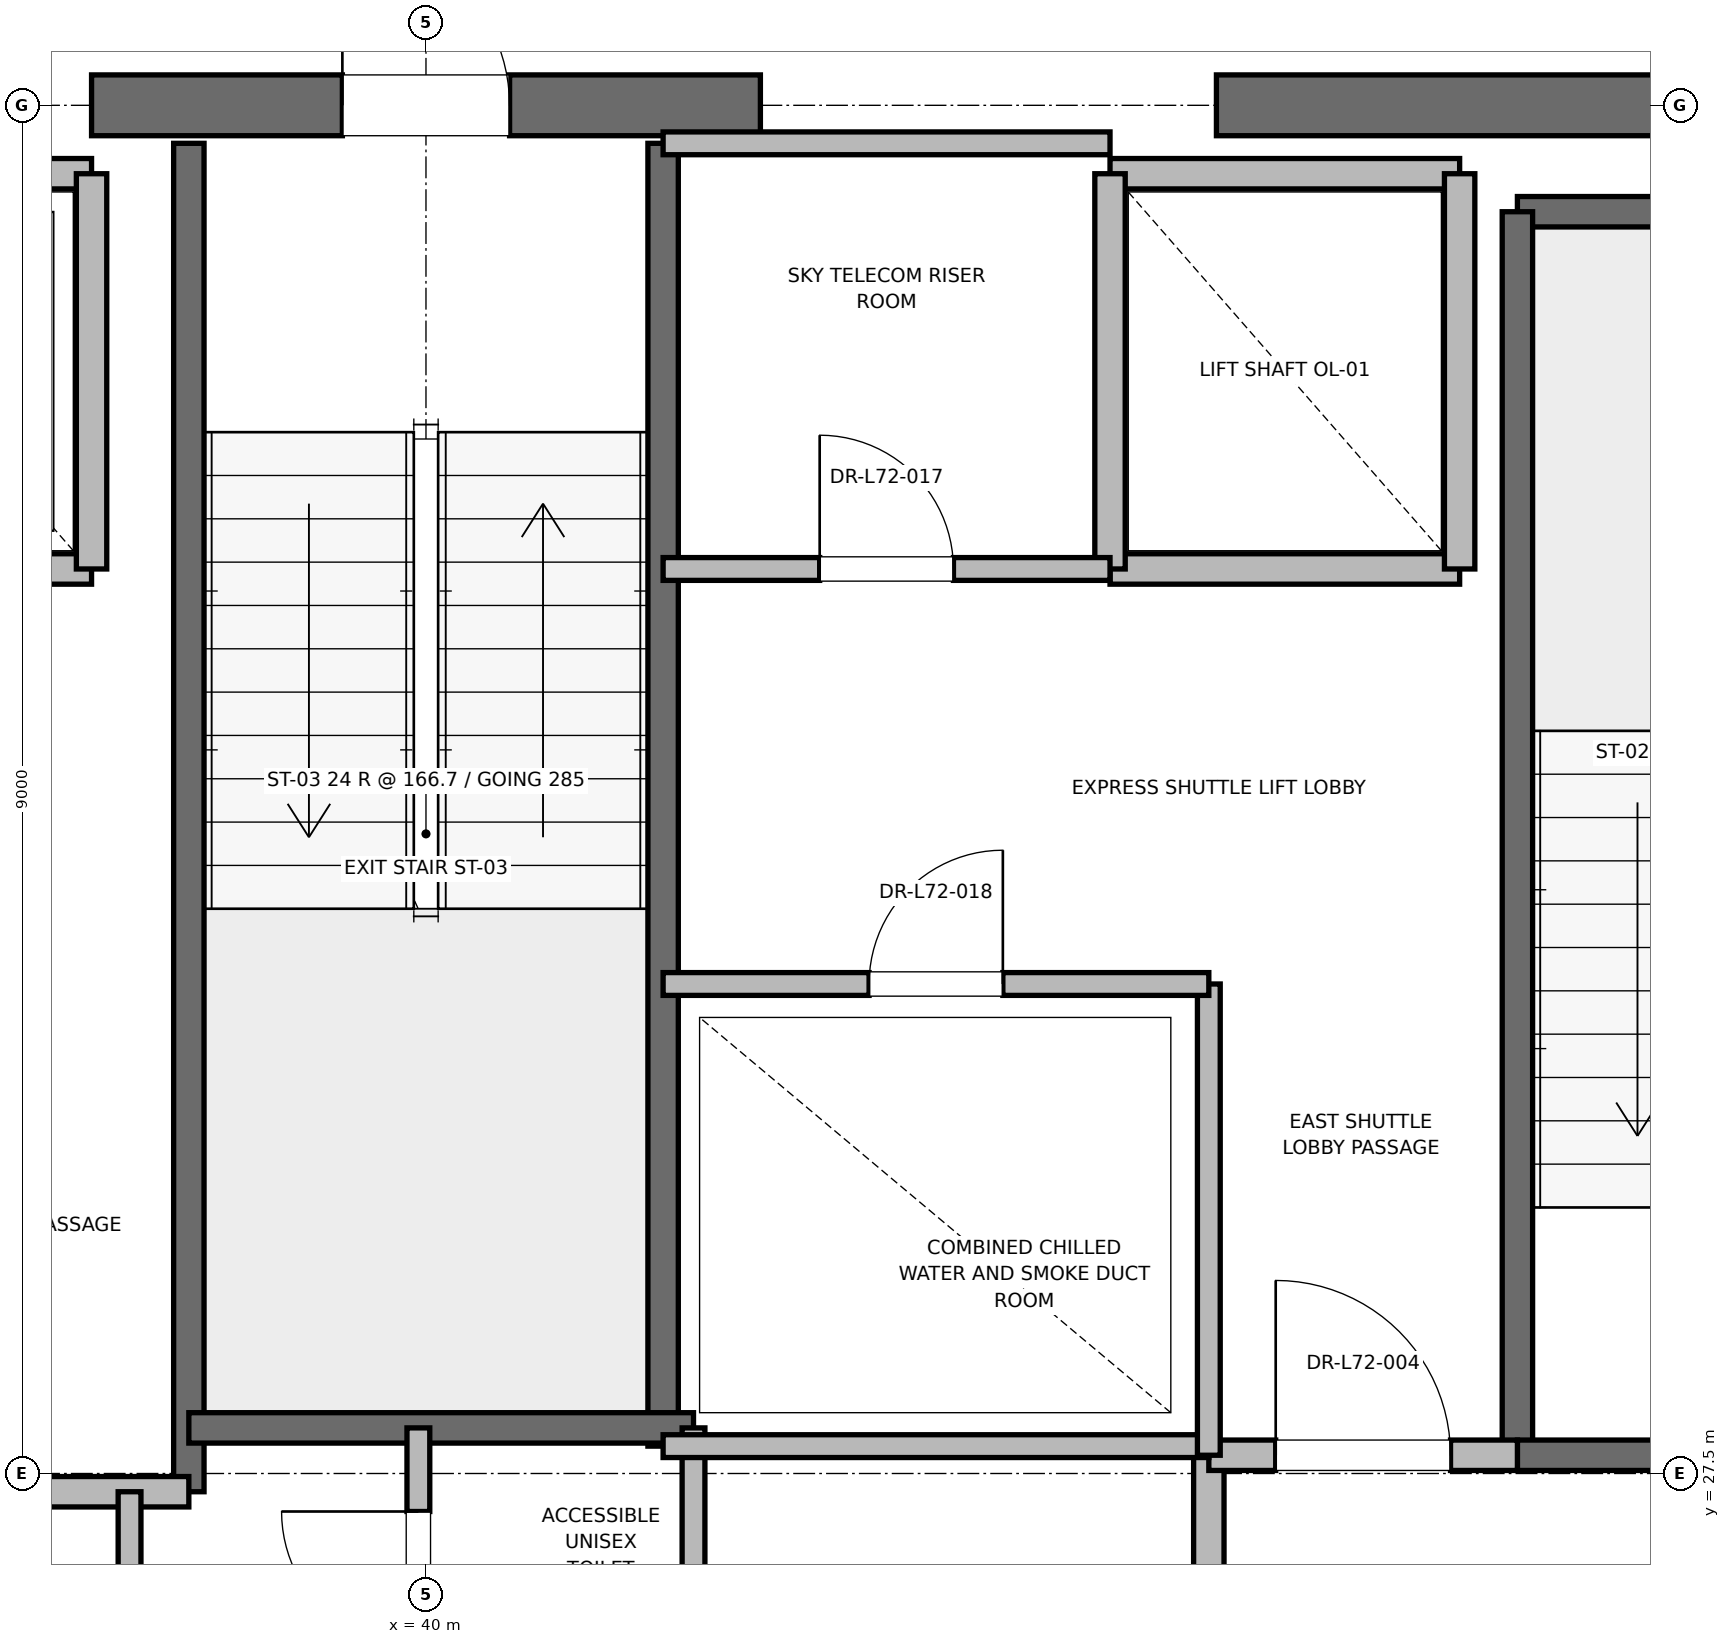
"""IFC4 building model, lengths in metres.
Left out: names, types, materials, properties, quantities, classifications, styles, units other than length and angle.
Written with IfcOpenShell. Run it as: python <this file> out.ifc"""

import sys

from ifc_helpers import new_model, si_unit, direction, frame, frame_2d, origin, place, context, subcontext, project, spatial, rectangle, extrude, element, fill, save


model = new_model("IFC4")
c1 = context("Model", 3, precision=1e-05, world=origin(), true_north=direction((0.0, 1.0)))
c2 = subcontext(c1, "Body", "Model", "MODEL_VIEW")
j1 = project(units=[si_unit("LENGTHUNIT", "METRE"), si_unit("PLANEANGLEUNIT", "RADIAN")], contexts=[c1])
p1 = place(None, origin())
s1 = spatial("IfcSite", under=j1, at=p1, CompositionType="ELEMENT")
p2 = place(p1, origin())
s2 = spatial("IfcBuilding", under=s1, at=p2, CompositionType="ELEMENT")
p3 = place(p2, frame((0.0, 0.0, 310.8)))
s3 = spatial("IfcBuildingStorey", under=s2, at=p3, CompositionType="ELEMENT", Elevation=310.8)
p4 = place(p3, frame((37.8, 36.5, 0.0), z_axis=(0.0, 0.0, 1.0), x_axis=(1.0, 0.0, 0.0)))
e1 = element("IfcWall", 1, at=p4, inside=s3, PredefinedType="SHEAR", context=c2, shape_type="SweptSolid", body=[
    extrude(rectangle(XDim=4.4, YDim=0.4, at=frame_2d((2.2, 0.0))), origin(), (0.0, 0.0, 1.0), 3.785),
])
p5 = place(p4, frame((1.65, 0.0, 0.0)))
e2 = element("IfcOpeningElement", 2, at=p5, cuts=e1, PredefinedType="OPENING", context=c2, shape_type="SweptSolid", body=[
    extrude(rectangle(XDim=1.1, YDim=2.15, at=frame_2d((0.55, 1.075))), frame((0.0, 0.2, 0.0), z_axis=(0.0, -1.0, 0.0), x_axis=(1.0, 0.0, 0.0)), (0.0, 0.0, 1.0), 0.4),
])
p6 = place(p3, frame((45.2, 36.5, 0.0), z_axis=(0.0, 0.0, 1.0), x_axis=(1.0, 0.0, 0.0)))
e3 = element("IfcWall", 3, at=p6, inside=s3, PredefinedType="SHEAR", context=c2, shape_type="SweptSolid", body=[
    extrude(rectangle(XDim=5.8, YDim=0.4, at=frame_2d((2.9, 0.0))), origin(), (0.0, 0.0, 1.0), 3.785),
])
p7 = place(p3, frame((47.18, 35.8, 0.0), z_axis=(0.0, 0.0, 1.0), x_axis=(1.0, 0.0, 0.0)))
e4 = element("IfcWall", 4, at=p7, inside=s3, PredefinedType="SOLIDWALL", context=c2, shape_type="SweptSolid", body=[
    extrude(rectangle(XDim=3.12, YDim=0.2, at=frame_2d((1.56, 0.0))), origin(), (0.0, 0.0, 1.0), 3.785),
])
p8 = place(p3, frame((47.18, 27.62, 0.0), z_axis=(0.0, 0.0, 1.0), x_axis=(0.0, 1.0, 0.0)))
e5 = element("IfcWall", 5, at=p8, inside=s3, PredefinedType="SOLIDWALL", context=c2, shape_type="SweptSolid", body=[
    extrude(rectangle(XDim=8.18, YDim=0.2, at=frame_2d((4.09, 0.0))), origin(), (0.0, 0.0, 1.0), 3.785),
])
p9 = place(p3, frame((47.18, 27.62, 0.0), z_axis=(0.0, 0.0, 1.0), x_axis=(1.0, 0.0, 0.0)))
e6 = element("IfcWall", 6, at=p9, inside=s3, PredefinedType="SOLIDWALL", context=c2, shape_type="SweptSolid", body=[
    extrude(rectangle(XDim=3.12, YDim=0.2, at=frame_2d((1.56, 0.0))), origin(), (0.0, 0.0, 1.0), 3.785),
])
p10 = place(p9, frame((1.01, 0.0, 0.0)))
e7 = element("IfcOpeningElement", 7, at=p10, cuts=e6, PredefinedType="OPENING", context=c2, shape_type="SweptSolid", body=[
    extrude(rectangle(XDim=1.1, YDim=2.15, at=frame_2d((0.55, 1.075))), frame((0.0, 0.1, 0.0), z_axis=(0.0, -1.0, 0.0), x_axis=(1.0, 0.0, 0.0)), (0.0, 0.0, 1.0), 0.2),
])
p11 = place(p3, frame((38.44, 27.38, 0.0), z_axis=(0.0, 0.0, 1.0), x_axis=(0.0, 1.0, 0.0)))
e8 = element("IfcWall", 8, at=p11, inside=s3, PredefinedType="SOLIDWALL", context=c2, shape_type="SweptSolid", body=[
    extrude(rectangle(XDim=8.87, YDim=0.2, at=frame_2d((4.435, 0.0))), origin(), (0.0, 0.0, 1.0), 3.785),
])
p12 = place(p3, frame((41.56, 27.68, 0.0), z_axis=(0.0, 0.0, 1.0), x_axis=(0.0, 1.0, 0.0)))
e9 = element("IfcWall", 9, at=p12, inside=s3, PredefinedType="SOLIDWALL", context=c2, shape_type="SweptSolid", body=[
    extrude(rectangle(XDim=8.57, YDim=0.2, at=frame_2d((4.285, 0.0))), origin(), (0.0, 0.0, 1.0), 3.785),
])
p13 = place(p3, frame((38.44, 27.8, 0.0), z_axis=(0.0, 0.0, 1.0), x_axis=(1.0, 0.0, 0.0)))
e10 = element("IfcWall", 10, at=p13, inside=s3, PredefinedType="SOLIDWALL", context=c2, shape_type="SweptSolid", body=[
    extrude(rectangle(XDim=3.32, YDim=0.2, at=frame_2d((1.66, 0.0))), origin(), (0.0, 0.0, 1.0), 3.785),
])
p14 = place(p3, frame((32.82, 27.38, 0.0), z_axis=(0.0, 0.0, 1.0), x_axis=(1.0, 0.0, 0.0)))
e11 = element("IfcWall", 11, at=p14, inside=s3, PredefinedType="PARTITIONING", context=c2, shape_type="SweptSolid", body=[
    extrude(rectangle(XDim=5.62, YDim=0.2, at=frame_2d((2.81, 0.0))), origin(), (0.0, 0.0, 1.0), 3.785),
])
p15 = place(p3, frame((45.15, 24.25, 0.0), z_axis=(0.0, 0.0, 1.0), x_axis=(0.0, 1.0, 0.0)))
e12 = element("IfcWall", 12, at=p15, inside=s3, PredefinedType="PARTITIONING", context=c2, shape_type="SweptSolid", body=[
    extrude(rectangle(XDim=3.37, YDim=0.2, at=frame_2d((1.685, 0.0))), origin(), (0.0, 0.0, 1.0), 3.785),
])
p16 = place(p3, frame((45.15, 27.62, 0.0), z_axis=(0.0, 0.0, 1.0), x_axis=(1.0, 0.0, 0.0)))
e13 = element("IfcWall", 13, at=p16, inside=s3, PredefinedType="PARTITIONING", context=c2, shape_type="SweptSolid", body=[
    extrude(rectangle(XDim=2.03, YDim=0.2, at=frame_2d((1.015, 0.0))), origin(), (0.0, 0.0, 1.0), 3.785),
])
p17 = place(p16, frame((0.44, 0.0, 0.0)))
e14 = element("IfcOpeningElement", 14, at=p17, cuts=e13, PredefinedType="OPENING", context=c2, shape_type="SweptSolid", body=[
    extrude(rectangle(XDim=1.15, YDim=2.2, at=frame_2d((0.575, 1.1))), frame((0.0, 0.1, 0.0), z_axis=(0.0, -1.0, 0.0), x_axis=(1.0, 0.0, 0.0)), (0.0, 0.0, 1.0), 0.2),
])
p18 = place(p3, frame((35.5, 33.45, 0.0), z_axis=(0.0, 0.0, 1.0), x_axis=(1.0, 0.0, 0.0)))
e15 = element("IfcWall", 15, at=p18, inside=s3, PredefinedType="SOLIDWALL", context=c2, shape_type="SweptSolid", body=[
    extrude(rectangle(XDim=2.3, YDim=0.2, at=frame_2d((1.15, 0.0))), origin(), (0.0, 0.0, 1.0), 3.785),
])
p19 = place(p18, frame((0.6, 0.0, 0.0)))
e16 = element("IfcOpeningElement", 16, at=p19, cuts=e15, PredefinedType="OPENING", context=c2, shape_type="SweptSolid", body=[
    extrude(rectangle(XDim=1.1, YDim=2.2, at=frame_2d((0.55, 1.1))), frame((0.0, 0.1, 0.0), z_axis=(0.0, -1.0, 0.0), x_axis=(1.0, 0.0, 0.0)), (0.0, 0.0, 1.0), 0.2),
])
p20 = place(p3, frame((37.8, 36.05, 0.0), z_axis=(0.0, 0.0, 1.0), x_axis=(-1.0, 0.0, 0.0)))
e17 = element("IfcWall", 17, at=p20, inside=s3, PredefinedType="SOLIDWALL", context=c2, shape_type="SweptSolid", body=[
    extrude(rectangle(XDim=2.3, YDim=0.2, at=frame_2d((1.15, 0.0))), origin(), (0.0, 0.0, 1.0), 2.865),
])
p21 = place(p3, frame((37.8, 33.45, 0.0), z_axis=(0.0, 0.0, 1.0), x_axis=(0.0, 1.0, 0.0)))
e18 = element("IfcWall", 18, at=p21, inside=s3, PredefinedType="SOLIDWALL", context=c2, shape_type="SweptSolid", body=[
    extrude(rectangle(XDim=2.6, YDim=0.2, at=frame_2d((1.3, 0.0))), origin(), (0.0, 0.0, 1.0), 2.865),
])
p22 = place(p3, frame((44.5, 33.45, 0.0), z_axis=(0.0, 0.0, 1.0), x_axis=(1.0, 0.0, 0.0)))
e19 = element("IfcWall", 19, at=p22, inside=s3, PredefinedType="SOLIDWALL", context=c2, shape_type="SweptSolid", body=[
    extrude(rectangle(XDim=2.3, YDim=0.2, at=frame_2d((1.15, 0.0))), origin(), (0.0, 0.0, 1.0), 3.785),
])
p23 = place(p3, frame((46.8, 36.05, 0.0), z_axis=(0.0, 0.0, 1.0), x_axis=(-1.0, 0.0, 0.0)))
e20 = element("IfcWall", 20, at=p23, inside=s3, PredefinedType="SOLIDWALL", context=c2, shape_type="SweptSolid", body=[
    extrude(rectangle(XDim=2.3, YDim=0.2, at=frame_2d((1.15, 0.0))), origin(), (0.0, 0.0, 1.0), 2.865),
])
p24 = place(p3, frame((44.5, 36.05, 0.0), z_axis=(0.0, 0.0, 1.0), x_axis=(0.0, -1.0, 0.0)))
e21 = element("IfcWall", 21, at=p24, inside=s3, PredefinedType="SOLIDWALL", context=c2, shape_type="SweptSolid", body=[
    extrude(rectangle(XDim=2.6, YDim=0.2, at=frame_2d((1.3, 0.0))), origin(), (0.0, 0.0, 1.0), 2.865),
])
p25 = place(p3, frame((46.8, 33.45, 0.0), z_axis=(0.0, 0.0, 1.0), x_axis=(0.0, 1.0, 0.0)))
e22 = element("IfcWall", 22, at=p25, inside=s3, PredefinedType="SOLIDWALL", context=c2, shape_type="SweptSolid", body=[
    extrude(rectangle(XDim=2.6, YDim=0.2, at=frame_2d((1.3, 0.0))), origin(), (0.0, 0.0, 1.0), 3.785),
])
p26 = place(p3, frame((41.76, 23.8, 0.0), z_axis=(0.0, 0.0, 1.0), x_axis=(0.0, 1.0, 0.0)))
e23 = element("IfcWall", 23, at=p26, inside=s3, PredefinedType="PARTITIONING", context=c2, shape_type="SweptSolid", body=[
    extrude(rectangle(XDim=4.0, YDim=0.15, at=frame_2d((2.0, 0.0))), origin(), (0.0, 0.0, 1.0), 2.85),
])
p27 = place(p3, frame((39.95, 25.8, 0.0), z_axis=(0.0, 0.0, 1.0), x_axis=(0.0, 1.0, 0.0)))
e24 = element("IfcWall", 24, at=p27, inside=s3, PredefinedType="PARTITIONING", context=c2, shape_type="SweptSolid", body=[
    extrude(rectangle(XDim=2.0, YDim=0.15, at=frame_2d((1.0, 0.0))), origin(), (0.0, 0.0, 1.0), 2.85),
])
p28 = place(p27, frame((0.55, 0.0, 0.0)))
e25 = element("IfcOpeningElement", 25, at=p28, cuts=e24, PredefinedType="OPENING", context=c2, shape_type="SweptSolid", body=[
    extrude(rectangle(XDim=0.9, YDim=2.1, at=frame_2d((0.45, 1.05))), frame((0.0, 0.075, 0.0), z_axis=(0.0, -1.0, 0.0), x_axis=(1.0, 0.0, 0.0)), (0.0, 0.0, 1.0), 0.15),
])
p29 = place(p3, frame((38.05, 18.6, 0.0), z_axis=(0.0, 0.0, 1.0), x_axis=(0.0, 1.0, 0.0)))
e26 = element("IfcWall", 26, at=p29, inside=s3, PredefinedType="PARTITIONING", context=c2, shape_type="SweptSolid", body=[
    extrude(rectangle(XDim=8.78, YDim=0.15, at=frame_2d((4.39, 0.0))), origin(), (0.0, 0.0, 1.0), 2.85),
])
p30 = place(p29, frame((3.89, 0.0, 0.0)))
e27 = element("IfcOpeningElement", 27, at=p30, cuts=e26, PredefinedType="OPENING", context=c2, shape_type="SweptSolid", body=[
    extrude(rectangle(XDim=1.0, YDim=2.15, at=frame_2d((0.5, 1.075))), frame((0.0, 0.075, 0.0), z_axis=(0.0, -1.0, 0.0), x_axis=(1.0, 0.0, 0.0)), (0.0, 0.0, 1.0), 0.15),
])
p31 = place(p3, frame((41.56, 27.68, 0.0), z_axis=(0.0, 0.0, 1.0), x_axis=(1.0, 0.0, 0.0)))
e28 = element("IfcWall", 28, at=p31, inside=s3, PredefinedType="PARTITIONING", context=c2, shape_type="SweptSolid", body=[
    extrude(rectangle(XDim=3.59, YDim=0.15, at=frame_2d((1.795, 0.0))), origin(), (0.0, 0.0, 1.0), 2.85),
])
p32 = place(p3, frame((45.15, 27.62, 0.0), z_axis=(0.0, 0.0, 1.0), x_axis=(0.0, 1.0, 0.0)))
e29 = element("IfcWall", 29, at=p32, inside=s3, PredefinedType="PARTITIONING", context=c2, shape_type="SweptSolid", body=[
    extrude(rectangle(XDim=3.1, YDim=0.15, at=frame_2d((1.55, 0.0))), origin(), (0.0, 0.0, 1.0), 2.85),
])
p33 = place(p3, frame((41.56, 30.72, 0.0), z_axis=(0.0, 0.0, 1.0), x_axis=(1.0, 0.0, 0.0)))
e30 = element("IfcWall", 30, at=p33, inside=s3, PredefinedType="PARTITIONING", context=c2, shape_type="SweptSolid", body=[
    extrude(rectangle(XDim=3.59, YDim=0.15, at=frame_2d((1.795, 0.0))), origin(), (0.0, 0.0, 1.0), 2.85),
])
p34 = place(p33, frame((1.355, 0.0, 0.0)))
e31 = element("IfcOpeningElement", 31, at=p34, cuts=e30, PredefinedType="OPENING", context=c2, shape_type="SweptSolid", body=[
    extrude(rectangle(XDim=0.88, YDim=2.1, at=frame_2d((0.44, 1.05))), frame((0.0, 0.075, 0.0), z_axis=(0.0, -1.0, 0.0), x_axis=(1.0, 0.0, 0.0)), (0.0, 0.0, 1.0), 0.15),
])
p35 = place(p3, frame((41.56, 36.25, 0.0), z_axis=(0.0, 0.0, 1.0), x_axis=(1.0, 0.0, 0.0)))
e32 = element("IfcWall", 32, at=p35, inside=s3, PredefinedType="PARTITIONING", context=c2, shape_type="SweptSolid", body=[
    extrude(rectangle(XDim=2.94, YDim=0.15, at=frame_2d((1.47, 0.0))), origin(), (0.0, 0.0, 1.0), 2.85),
])
p36 = place(p3, frame((41.56, 33.45, 0.0), z_axis=(0.0, 0.0, 1.0), x_axis=(1.0, 0.0, 0.0)))
e33 = element("IfcWall", 33, at=p36, inside=s3, PredefinedType="PARTITIONING", context=c2, shape_type="SweptSolid", body=[
    extrude(rectangle(XDim=2.94, YDim=0.15, at=frame_2d((1.47, 0.0))), origin(), (0.0, 0.0, 1.0), 2.85),
])
p37 = place(p36, frame((1.03, 0.0, 0.0)))
e34 = element("IfcOpeningElement", 34, at=p37, cuts=e33, PredefinedType="OPENING", context=c2, shape_type="SweptSolid", body=[
    extrude(rectangle(XDim=0.88, YDim=2.1, at=frame_2d((0.44, 1.05))), frame((0.0, 0.075, 0.0), z_axis=(0.0, -1.0, 0.0), x_axis=(1.0, 0.0, 0.0)), (0.0, 0.0, 1.0), 0.15),
])
p38 = place(p5, origin())
e35 = element("IfcDoor", 35, at=p38, inside=s3, OperationType="SINGLE_SWING_LEFT", PredefinedType="DOOR", context=c2, shape_type="SweptSolid", body=[
    extrude(rectangle(XDim=1.1, YDim=2.15, at=frame_2d((0.55, 1.075))), frame((0.0, 0.025, 0.0), z_axis=(0.0, -1.0, 0.0), x_axis=(1.0, 0.0, 0.0)), (0.0, 0.0, 1.0), 0.05),
])
fill(e2, e35)
p39 = place(p17, origin())
e36 = element("IfcDoor", 36, at=p39, inside=s3, OperationType="SINGLE_SWING_LEFT", PredefinedType="DOOR", context=c2, shape_type="SweptSolid", body=[
    extrude(rectangle(XDim=1.15, YDim=2.2, at=frame_2d((0.575, 1.1))), frame((0.0, 0.025, 0.0), z_axis=(0.0, -1.0, 0.0), x_axis=(1.0, 0.0, 0.0)), (0.0, 0.0, 1.0), 0.05),
])
fill(e14, e36)
p40 = place(p28, origin())
e37 = element("IfcDoor", 37, at=p40, inside=s3, OperationType="SINGLE_SWING_RIGHT", PredefinedType="DOOR", context=c2, shape_type="SweptSolid", body=[
    extrude(rectangle(XDim=0.9, YDim=2.1, at=frame_2d((0.45, 1.05))), frame((0.0, 0.025, 0.0), z_axis=(0.0, -1.0, 0.0), x_axis=(1.0, 0.0, 0.0)), (0.0, 0.0, 1.0), 0.05),
])
fill(e25, e37)
p41 = place(p34, origin())
e38 = element("IfcDoor", 38, at=p41, inside=s3, OperationType="SINGLE_SWING_RIGHT", PredefinedType="DOOR", context=c2, shape_type="SweptSolid", body=[
    extrude(rectangle(XDim=0.88, YDim=2.1, at=frame_2d((0.44, 1.05))), frame((0.0, 0.025, 0.0), z_axis=(0.0, -1.0, 0.0), x_axis=(1.0, 0.0, 0.0)), (0.0, 0.0, 1.0), 0.05),
])
fill(e31, e38)
p42 = place(p37, origin())
e39 = element("IfcDoor", 39, at=p42, inside=s3, OperationType="SINGLE_SWING_LEFT", PredefinedType="DOOR", context=c2, shape_type="SweptSolid", body=[
    extrude(rectangle(XDim=0.88, YDim=2.1, at=frame_2d((0.44, 1.05))), frame((0.0, 0.025, 0.0), z_axis=(0.0, -1.0, 0.0), x_axis=(1.0, 0.0, 0.0)), (0.0, 0.0, 1.0), 0.05),
])
fill(e34, e39)
save(model, sys.argv[1])
